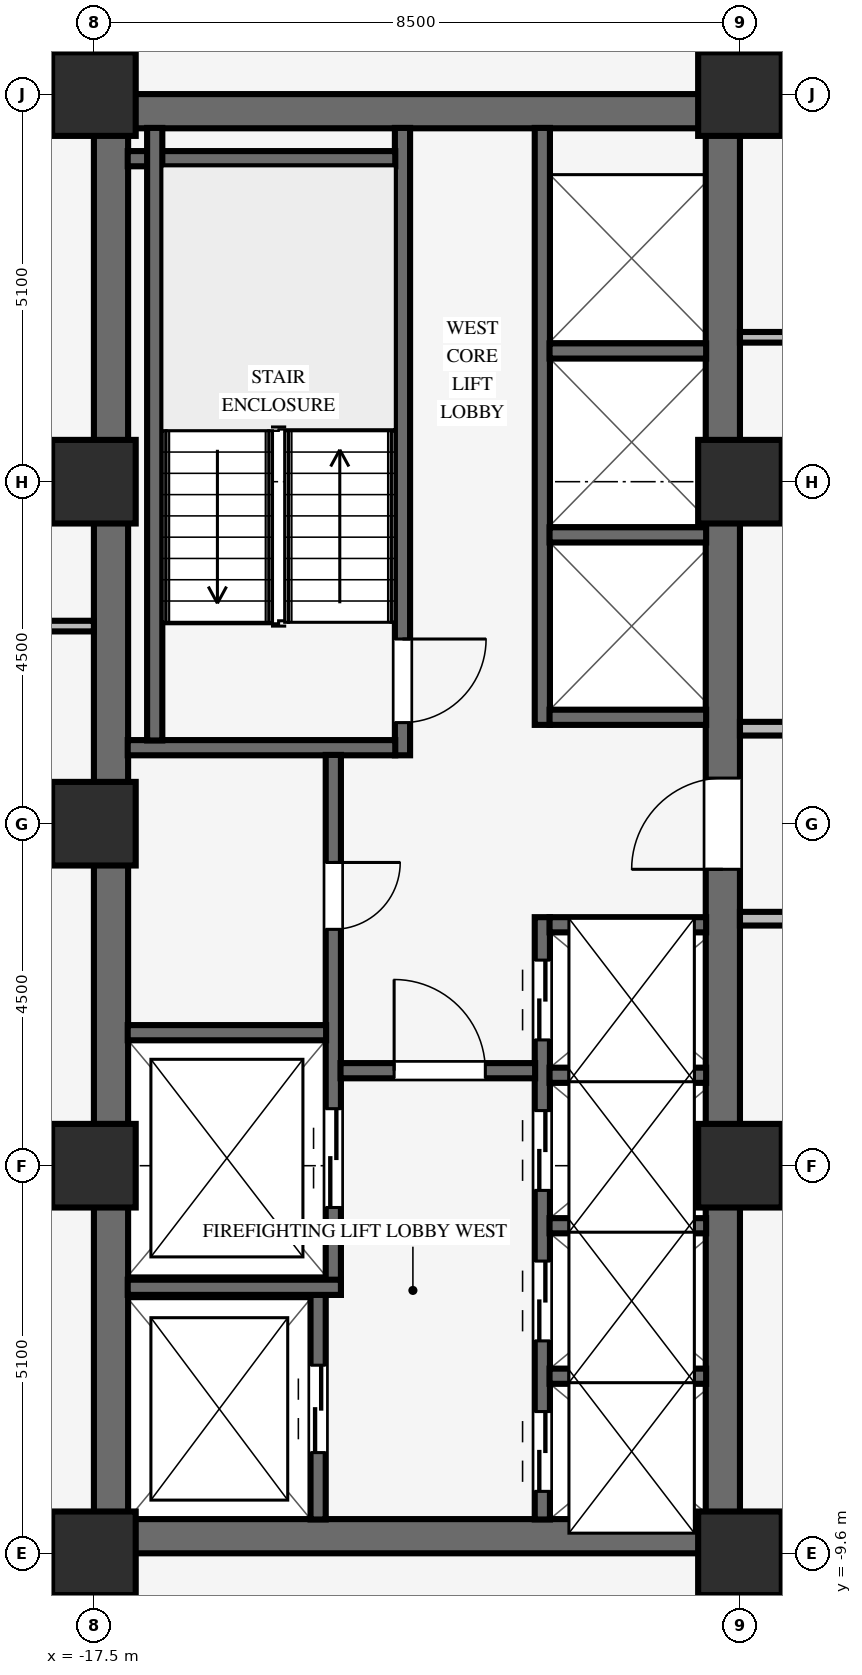
"""IFC4 building model, lengths in metres.
Left out: names, types, materials, properties, quantities, classifications, styles, units other than length and angle.
Written with IfcOpenShell. Run it as: python <this file> out.ifc"""

import sys

from ifc_helpers import new_model, si_unit, direction, frame, frame_2d, origin, origin_2d, place, context, subcontext, project, spatial, rectangle, extrude, source, transform, mapped, element, fill, save


model = new_model("IFC4")
c1 = context("Model", 3, precision=1e-05, world=origin(), true_north=direction((0.0, 1.0)))
c2 = subcontext(c1, "Body", "Model", "MODEL_VIEW")
j1 = project(units=[si_unit("LENGTHUNIT", "METRE"), si_unit("PLANEANGLEUNIT", "RADIAN")], contexts=[c1])
p1 = place(None, origin())
s1 = spatial("IfcSite", under=j1, at=p1, CompositionType="ELEMENT")
p2 = place(p1, origin())
s2 = spatial("IfcBuilding", under=s1, at=p2, CompositionType="ELEMENT")
p3 = place(p2, frame((0.0, 0.0, 67.75)))
s3 = spatial("IfcBuildingStorey", under=s2, at=p3, CompositionType="ELEMENT", Elevation=67.75)
for number, where, z_axis, x_axis in (
    (1, (-17.5, -9.375, 0.0), (0.0, 0.0, 1.0), (1.0, 0.0, 0.0)),
    (2, (-17.5, 9.375, 0.0), (0.0, 0.0, 1.0), (1.0, 0.0, 0.0)),
):
    element("IfcWall", number, at=place(p3, frame(where, z_axis=z_axis, x_axis=x_axis)), inside=s3, PredefinedType="SHEAR", context=c2, shape_type="SweptSolid", body=[
        extrude(rectangle(XDim=8.5, YDim=0.45, at=frame_2d((4.25, 0.0))), origin(), (0.0, 0.0, 1.0), 3.37),
    ])
p4 = place(p3, frame((-17.275, -9.155, 0.0), z_axis=(0.0, 0.0, 1.0), x_axis=(0.0, 1.0, 0.0)))
e3 = element("IfcWall", 3, at=p4, inside=s3, PredefinedType="SHEAR", context=c2, shape_type="SweptSolid", body=[
    extrude(rectangle(XDim=18.31, YDim=0.45, at=frame_2d((9.155, 0.0))), origin(), (0.0, 0.0, 1.0), 3.37),
])
p5 = place(p3, frame((-9.225, -9.155, 0.0), z_axis=(0.0, 0.0, 1.0), x_axis=(0.0, 1.0, 0.0)))
e4 = element("IfcWall", 4, at=p5, inside=s3, PredefinedType="SHEAR", context=c2, shape_type="SweptSolid", body=[
    extrude(rectangle(XDim=18.31, YDim=0.45, at=frame_2d((9.155, 0.0))), origin(), (0.0, 0.0, 1.0), 3.37),
])
p6 = place(p5, frame((8.555, 0.0, 0.0)))
e5 = element("IfcOpeningElement", 5, at=p6, cuts=e4, PredefinedType="OPENING", context=c2, shape_type="SweptSolid", body=[
    extrude(rectangle(XDim=1.2, YDim=2.15, at=frame_2d((0.6, 1.075))), frame((0.0, 0.235, 0.0), z_axis=(0.0, -1.0, 0.0), x_axis=(1.0, 0.0, 0.0)), (0.0, 0.0, 1.0), 0.47),
])
for number, where, z_axis, x_axis in (
    (6, (-17.5, -9.6, 0.0), (0.0, 0.0, 1.0), (1.0, 0.0, 0.0)),
    (7, (-17.5, -4.5, 0.0), (0.0, 0.0, 1.0), (1.0, 0.0, 0.0)),
    (8, (-17.5, 4.5, 0.0), (0.0, 0.0, 1.0), (1.0, 0.0, 0.0)),
    (9, (-17.5, 9.6, 0.0), (0.0, 0.0, 1.0), (1.0, 0.0, 0.0)),
    (10, (-9.0, -9.6, 0.0), (0.0, 0.0, 1.0), (1.0, 0.0, 0.0)),
    (11, (-9.0, -4.5, 0.0), (0.0, 0.0, 1.0), (1.0, 0.0, 0.0)),
    (12, (-9.0, 4.5, 0.0), (0.0, 0.0, 1.0), (1.0, 0.0, 0.0)),
    (13, (-9.0, 9.6, 0.0), (0.0, 0.0, 1.0), (1.0, 0.0, 0.0)),
    (14, (-17.5, 0.0, 0.0), (0.0, 0.0, 1.0), (1.0, 0.0, 0.0)),
):
    element("IfcColumn", number, at=place(p3, frame(where, z_axis=z_axis, x_axis=x_axis)), inside=s3, PredefinedType="COLUMN", context=c2, shape_type="SweptSolid", body=[
        extrude(rectangle(XDim=1.1, YDim=1.1, at=origin_2d()), origin(), (0.0, 0.0, 1.0), 3.37),
    ])
p7 = place(p3, frame((-13.44, 0.9, 0.0), z_axis=(0.0, 0.0, 1.0), x_axis=(0.0, 1.0, 0.0)))
e15 = element("IfcWall", 15, at=p7, inside=s3, PredefinedType="SHEAR", context=c2, shape_type="SweptSolid", body=[
    extrude(rectangle(XDim=8.255, YDim=0.2, at=frame_2d((4.127, 0.0))), origin(), (0.0, 0.0, 1.0), 3.37),
])
p8 = place(p7, frame((1.53, 0.0, 0.0), z_axis=(0.0, 0.0, 1.0), x_axis=(-1.0, 0.0, 0.0)))
e16 = element("IfcOpeningElement", 16, at=p8, cuts=e15, PredefinedType="OPENING", context=c2, shape_type="SweptSolid", body=[
    extrude(rectangle(XDim=1.1, YDim=2.15, at=frame_2d((0.55, 1.075))), frame((0.0, 0.11, 0.0), z_axis=(0.0, -1.0, 0.0), x_axis=(1.0, 0.0, 0.0)), (0.0, 0.0, 1.0), 0.22),
])
for number, where, z_axis, x_axis in (
    (17, (-17.055, 1.0, 0.0), (0.0, 0.0, 1.0), (1.0, 0.0, 0.0)),
    (18, (-17.055, 8.75, 0.0), (0.0, 0.0, 1.0), (1.0, 0.0, 0.0)),
):
    element("IfcWall", number, at=place(p3, frame(where, z_axis=z_axis, x_axis=x_axis)), inside=s3, PredefinedType="SHEAR", context=c2, shape_type="SweptSolid", body=[
        extrude(rectangle(XDim=3.52, YDim=0.2, at=frame_2d((1.76, 0.0))), origin(), (0.0, 0.0, 1.0), 3.37),
    ])
p9 = place(p3, frame((-16.7, 1.095, 0.0), z_axis=(0.0, 0.0, 1.0), x_axis=(0.0, 1.0, 0.0)))
e19 = element("IfcWall", 19, at=p9, inside=s3, PredefinedType="SHEAR", context=c2, shape_type="SweptSolid", body=[
    extrude(rectangle(XDim=8.06, YDim=0.2, at=frame_2d((4.03, 0.0))), origin(), (0.0, 0.0, 1.0), 3.37),
])
p10 = place(p3, frame((-14.55, -9.155, 0.0), z_axis=(0.0, 0.0, 1.0), x_axis=(0.0, 1.0, 0.0)))
e20 = element("IfcWall", 20, at=p10, inside=s3, PredefinedType="SHEAR", context=c2, shape_type="SweptSolid", body=[
    extrude(rectangle(XDim=2.96, YDim=0.2, at=frame_2d((1.48, 0.0))), origin(), (0.0, 0.0, 1.0), 3.37),
])
p11 = place(p10, frame((0.88, 0.0, 0.0)))
e21 = element("IfcOpeningElement", 21, at=p11, cuts=e20, PredefinedType="OPENING", context=c2, shape_type="SweptSolid", body=[
    extrude(rectangle(XDim=1.15, YDim=2.15, at=frame_2d((0.575, 1.075))), frame((0.0, 0.11, 0.0), z_axis=(0.0, -1.0, 0.0), x_axis=(1.0, 0.0, 0.0)), (0.0, 0.0, 1.0), 0.22),
])
p12 = place(p3, frame((-14.35, -6.2, 0.0), z_axis=(0.0, 0.0, 1.0), x_axis=(0.0, 1.0, 0.0)))
e22 = element("IfcWall", 22, at=p12, inside=s3, PredefinedType="SHEAR", context=c2, shape_type="SweptSolid", body=[
    extrude(rectangle(XDim=7.105, YDim=0.2, at=frame_2d((3.552, 0.0))), origin(), (0.0, 0.0, 1.0), 3.37),
])
p13 = place(p12, frame((5.69, 0.0, 0.0), z_axis=(0.0, 0.0, 1.0), x_axis=(-1.0, 0.0, 0.0)))
e23 = element("IfcOpeningElement", 23, at=p13, cuts=e22, PredefinedType="OPENING", context=c2, shape_type="SweptSolid", body=[
    extrude(rectangle(XDim=0.88, YDim=2.1, at=frame_2d((0.44, 1.05))), frame((0.0, 0.11, 0.0), z_axis=(0.0, -1.0, 0.0), x_axis=(1.0, 0.0, 0.0)), (0.0, 0.0, 1.0), 0.22),
])
p14 = place(p12, frame((1.15, 0.0, 0.0)))
e24 = element("IfcOpeningElement", 24, at=p14, cuts=e22, PredefinedType="OPENING", context=c2, shape_type="SweptSolid", body=[
    extrude(rectangle(XDim=1.3, YDim=2.2, at=frame_2d((0.65, 1.1))), frame((0.0, 0.11, 0.0), z_axis=(0.0, -1.0, 0.0), x_axis=(1.0, 0.0, 0.0)), (0.0, 0.0, 1.0), 0.22),
])
p15 = place(p3, frame((-17.055, -6.1, 0.0), z_axis=(0.0, 0.0, 1.0), x_axis=(1.0, 0.0, 0.0)))
e25 = element("IfcWall", 25, at=p15, inside=s3, PredefinedType="SHEAR", context=c2, shape_type="SweptSolid", body=[
    extrude(rectangle(XDim=2.805, YDim=0.2, at=frame_2d((1.402, 0.0))), origin(), (0.0, 0.0, 1.0), 3.37),
])
p16 = place(p3, frame((-17.055, -2.75, 0.0), z_axis=(0.0, 0.0, 1.0), x_axis=(1.0, 0.0, 0.0)))
e26 = element("IfcWall", 26, at=p16, inside=s3, PredefinedType="SHEAR", context=c2, shape_type="SweptSolid", body=[
    extrude(rectangle(XDim=2.61, YDim=0.2, at=frame_2d((1.305, 0.0))), origin(), (0.0, 0.0, 1.0), 3.37),
])
p17 = place(p3, frame((-11.6, -9.155, 0.0), z_axis=(0.0, 0.0, 1.0), x_axis=(0.0, 1.0, 0.0)))
e27 = element("IfcWall", 27, at=p17, inside=s3, PredefinedType="SHEAR", context=c2, shape_type="SweptSolid", body=[
    extrude(rectangle(XDim=7.925, YDim=0.2, at=frame_2d((3.962, 0.0))), origin(), (0.0, 0.0, 1.0), 3.37),
])
p18 = place(p17, frame((0.37, 0.0, 0.0)))
e28 = element("IfcOpeningElement", 28, at=p18, cuts=e27, PredefinedType="OPENING", context=c2, shape_type="SweptSolid", body=[
    extrude(rectangle(XDim=1.05, YDim=2.15, at=frame_2d((0.525, 1.075))), frame((0.0, 0.11, 0.0), z_axis=(0.0, -1.0, 0.0), x_axis=(1.0, 0.0, 0.0)), (0.0, 0.0, 1.0), 0.22),
])
p19 = place(p17, frame((2.35, 0.0, 0.0)))
e29 = element("IfcOpeningElement", 29, at=p19, cuts=e27, PredefinedType="OPENING", context=c2, shape_type="SweptSolid", body=[
    extrude(rectangle(XDim=1.05, YDim=2.15, at=frame_2d((0.525, 1.075))), frame((0.0, 0.11, 0.0), z_axis=(0.0, -1.0, 0.0), x_axis=(1.0, 0.0, 0.0)), (0.0, 0.0, 1.0), 0.22),
])
p20 = place(p17, frame((4.33, 0.0, 0.0)))
e30 = element("IfcOpeningElement", 30, at=p20, cuts=e27, PredefinedType="OPENING", context=c2, shape_type="SweptSolid", body=[
    extrude(rectangle(XDim=1.05, YDim=2.15, at=frame_2d((0.525, 1.075))), frame((0.0, 0.11, 0.0), z_axis=(0.0, -1.0, 0.0), x_axis=(1.0, 0.0, 0.0)), (0.0, 0.0, 1.0), 0.22),
])
p21 = place(p17, frame((6.31, 0.0, 0.0)))
e31 = element("IfcOpeningElement", 31, at=p21, cuts=e27, PredefinedType="OPENING", context=c2, shape_type="SweptSolid", body=[
    extrude(rectangle(XDim=1.05, YDim=2.15, at=frame_2d((0.525, 1.075))), frame((0.0, 0.11, 0.0), z_axis=(0.0, -1.0, 0.0), x_axis=(1.0, 0.0, 0.0)), (0.0, 0.0, 1.0), 0.22),
])
p22 = place(p3, frame((-14.255, -3.25, 0.0), z_axis=(0.0, 0.0, 1.0), x_axis=(1.0, 0.0, 0.0)))
e32 = element("IfcWall", 32, at=p22, inside=s3, PredefinedType="SHEAR", context=c2, shape_type="SweptSolid", body=[
    extrude(rectangle(XDim=2.56, YDim=0.2, at=frame_2d((1.28, 0.0))), origin(), (0.0, 0.0, 1.0), 3.37),
])
p23 = place(p22, frame((0.705, 0.0, 0.0)))
e33 = element("IfcOpeningElement", 33, at=p23, cuts=e32, PredefinedType="OPENING", context=c2, shape_type="SweptSolid", body=[
    extrude(rectangle(XDim=1.2, YDim=2.15, at=frame_2d((0.6, 1.075))), frame((0.0, 0.11, 0.0), z_axis=(0.0, -1.0, 0.0), x_axis=(1.0, 0.0, 0.0)), (0.0, 0.0, 1.0), 0.22),
])
for number, where, z_axis, x_axis in (
    (34, (-11.505, -7.27, 0.0), (0.0, 0.0, 1.0), (1.0, 0.0, 0.0)),
    (35, (-11.505, -5.29, 0.0), (0.0, 0.0, 1.0), (1.0, 0.0, 0.0)),
    (36, (-11.505, -3.31, 0.0), (0.0, 0.0, 1.0), (1.0, 0.0, 0.0)),
    (37, (-11.505, -1.33, 0.0), (0.0, 0.0, 1.0), (1.0, 0.0, 0.0)),
):
    element("IfcWall", number, at=place(p3, frame(where, z_axis=z_axis, x_axis=x_axis)), inside=s3, PredefinedType="SHEAR", context=c2, shape_type="SweptSolid", body=[
        extrude(rectangle(XDim=2.06, YDim=0.2, at=frame_2d((1.03, 0.0))), origin(), (0.0, 0.0, 1.0), 3.37),
    ])
p24 = place(p3, frame((-11.6, 1.3, 0.0), z_axis=(0.0, 0.0, 1.0), x_axis=(0.0, 1.0, 0.0)))
e38 = element("IfcWall", 38, at=p24, inside=s3, PredefinedType="SHEAR", context=c2, shape_type="SweptSolid", body=[
    extrude(rectangle(XDim=7.855, YDim=0.2, at=frame_2d((3.927, 0.0))), origin(), (0.0, 0.0, 1.0), 3.37),
])
for number, where, z_axis, x_axis in (
    (39, (-11.505, 1.4, 0.0), (0.0, 0.0, 1.0), (1.0, 0.0, 0.0)),
    (40, (-11.505, 3.8, 0.0), (0.0, 0.0, 1.0), (1.0, 0.0, 0.0)),
    (41, (-11.505, 6.22, 0.0), (0.0, 0.0, 1.0), (1.0, 0.0, 0.0)),
):
    element("IfcWall", number, at=place(p3, frame(where, z_axis=z_axis, x_axis=x_axis)), inside=s3, PredefinedType="SHEAR", context=c2, shape_type="SweptSolid", body=[
        extrude(rectangle(XDim=2.06, YDim=0.2, at=frame_2d((1.03, 0.0))), origin(), (0.0, 0.0, 1.0), 3.37),
    ])
p25 = place(p3, frame((-8.454, -9.6, 0.0), z_axis=(0.0, 0.0, 1.0), x_axis=(1.0, 0.0, 0.0)))
e42 = element("IfcWall", 42, at=p25, inside=s3, PredefinedType="PARTITIONING", context=c2, shape_type="SweptSolid", body=[
    extrude(rectangle(XDim=5.254, YDim=0.18, at=frame_2d((2.627, 0.0))), origin(), (0.0, 0.0, 1.0), 2.405),
])
p26 = place(p3, frame((-9.0, -1.25, 0.0), z_axis=(0.0, 0.0, 1.0), x_axis=(1.0, 0.0, 0.0)))
e43 = element("IfcWall", 43, at=p26, inside=s3, PredefinedType="PARTITIONING", context=c2, shape_type="SweptSolid", body=[
    extrude(rectangle(XDim=5.8, YDim=0.18, at=frame_2d((2.9, 0.0))), origin(), (0.0, 0.0, 1.0), 3.36),
])
p27 = place(p3, frame((-9.0, 1.25, 0.0), z_axis=(0.0, 0.0, 1.0), x_axis=(1.0, 0.0, 0.0)))
e44 = element("IfcWall", 44, at=p27, inside=s3, PredefinedType="PARTITIONING", context=c2, shape_type="SweptSolid", body=[
    extrude(rectangle(XDim=5.8, YDim=0.18, at=frame_2d((2.9, 0.0))), origin(), (0.0, 0.0, 1.0), 3.36),
])
p28 = place(p27, frame((2.42, 0.0, 0.0)))
e45 = element("IfcOpeningElement", 45, at=p28, cuts=e44, PredefinedType="OPENING", context=c2, shape_type="SweptSolid", body=[
    extrude(rectangle(XDim=0.96, YDim=2.1, at=frame_2d((0.48, 1.05))), frame((0.0, 0.1, 0.0), z_axis=(0.0, -1.0, 0.0), x_axis=(1.0, 0.0, 0.0)), (0.0, 0.0, 1.0), 0.2),
])
p29 = place(p3, frame((-21.16, 2.6, 0.0), z_axis=(0.0, 0.0, 1.0), x_axis=(1.0, 0.0, 0.0)))
e46 = element("IfcWall", 46, at=p29, inside=s3, PredefinedType="PARTITIONING", context=c2, shape_type="SweptSolid", body=[
    extrude(rectangle(XDim=3.66, YDim=0.14, at=frame_2d((1.83, 0.0))), origin(), (0.0, 0.0, 1.0), 3.36),
])
p30 = place(p3, frame((-9.0, 6.4, 0.0), z_axis=(0.0, 0.0, 1.0), x_axis=(1.0, 0.0, 0.0)))
e47 = element("IfcWall", 47, at=p30, inside=s3, PredefinedType="PARTITIONING", context=c2, shape_type="SweptSolid", body=[
    extrude(rectangle(XDim=5.714, YDim=0.14, at=frame_2d((2.857, 0.0))), origin(), (0.0, 0.0, 1.0), 3.36),
])
p31 = place(p3, frame((-8.454, 9.6, 0.0), z_axis=(0.0, 0.0, 1.0), x_axis=(1.0, 0.0, 0.0)))
e48 = element("IfcWall", 48, at=p31, inside=s3, PredefinedType="PARTITIONING", context=c2, shape_type="SweptSolid", body=[
    extrude(rectangle(XDim=5.254, YDim=0.18, at=frame_2d((2.627, 0.0))), origin(), (0.0, 0.0, 1.0), 2.405),
])
p32 = place(p31, frame((2.147, 0.0, 0.0)))
e49 = element("IfcOpeningElement", 49, at=p32, cuts=e48, PredefinedType="OPENING", context=c2, shape_type="SweptSolid", body=[
    extrude(rectangle(XDim=0.96, YDim=2.1, at=frame_2d((0.48, 1.05))), frame((0.0, 0.1, 0.0), z_axis=(0.0, -1.0, 0.0), x_axis=(1.0, 0.0, 0.0)), (0.0, 0.0, 1.0), 0.2),
])
for number, where, z_axis, x_axis in (
    (50, (-17.5, -11.114, 0.0), (0.0, 0.0, 1.0), (0.0, 1.0, 0.0)),
    (51, (-17.5, 10.146, 0.0), (0.0, 0.0, 1.0), (0.0, 1.0, 0.0)),
):
    element("IfcWall", number, at=place(p3, frame(where, z_axis=z_axis, x_axis=x_axis)), inside=s3, PredefinedType="PARTITIONING", context=c2, shape_type="SweptSolid", body=[
        extrude(rectangle(XDim=0.968, YDim=0.18, at=frame_2d((0.484, 0.0))), origin(), (0.0, 0.0, 1.0), 2.738),
    ])
m1 = source(origin(), c2, "Body", "SweptSolid", [
    extrude(rectangle(XDim=1.1, YDim=2.15, at=frame_2d((0.55, 1.075))), frame((0.0, 0.025, 0.0), z_axis=(0.0, -1.0, 0.0), x_axis=(1.0, 0.0, 0.0)), (0.0, 0.0, 1.0), 0.05),
])
p33 = place(p8, origin())
e52 = element("IfcDoor", 52, at=p33, inside=s3, OperationType="SINGLE_SWING_LEFT", PredefinedType="DOOR", context=c2, shape_type="MappedRepresentation", body=[
    mapped(m1, transform((0.0, 0.0, 0.0), scale=1.0)),
])
fill(e16, e52)
m2 = source(origin(), c2, "Body", "SweptSolid", [
    extrude(rectangle(XDim=0.88, YDim=2.1, at=frame_2d((0.44, 1.05))), frame((0.0, 0.025, 0.0), z_axis=(0.0, -1.0, 0.0), x_axis=(1.0, 0.0, 0.0)), (0.0, 0.0, 1.0), 0.05),
])
p34 = place(p13, origin())
e53 = element("IfcDoor", 53, at=p34, inside=s3, OperationType="SINGLE_SWING_LEFT", PredefinedType="DOOR", context=c2, shape_type="MappedRepresentation", body=[
    mapped(m2, transform((0.0, 0.0, 0.0), scale=1.0)),
])
fill(e23, e53)
m3 = source(origin(), c2, "Body", "SweptSolid", [
    extrude(rectangle(XDim=1.2, YDim=2.15, at=frame_2d((0.6, 1.075))), frame((0.0, 0.025, 0.0), z_axis=(0.0, -1.0, 0.0), x_axis=(1.0, 0.0, 0.0)), (0.0, 0.0, 1.0), 0.05),
])
p35 = place(p23, origin())
e54 = element("IfcDoor", 54, at=p35, inside=s3, OperationType="SINGLE_SWING_LEFT", PredefinedType="DOOR", context=c2, shape_type="MappedRepresentation", body=[
    mapped(m3, transform((0.0, 0.0, 0.0), scale=1.0)),
])
fill(e33, e54)
p36 = place(p6, origin())
e55 = element("IfcDoor", 55, at=p36, inside=s3, OperationType="SINGLE_SWING_LEFT", PredefinedType="DOOR", context=c2, shape_type="MappedRepresentation", body=[
    mapped(m3, transform((0.0, 0.0, 0.0), scale=1.0)),
])
fill(e5, e55)
m4 = source(origin(), c2, "Body", "SweptSolid", [
    extrude(rectangle(XDim=1.15, YDim=2.15, at=frame_2d((0.575, 1.075))), frame((0.0, 0.025, 0.0), z_axis=(0.0, -1.0, 0.0), x_axis=(1.0, 0.0, 0.0)), (0.0, 0.0, 1.0), 0.05),
])
p37 = place(p11, origin())
e56 = element("IfcDoor", 56, at=p37, inside=s3, OperationType="DOUBLE_DOOR_SLIDING", PredefinedType="DOOR", context=c2, shape_type="MappedRepresentation", body=[
    mapped(m4, transform((0.0, 0.0, 0.0), scale=1.0)),
])
fill(e21, e56)
m5 = source(origin(), c2, "Body", "SweptSolid", [
    extrude(rectangle(XDim=1.3, YDim=2.2, at=frame_2d((0.65, 1.1))), frame((0.0, 0.025, 0.0), z_axis=(0.0, -1.0, 0.0), x_axis=(1.0, 0.0, 0.0)), (0.0, 0.0, 1.0), 0.05),
])
p38 = place(p14, origin())
e57 = element("IfcDoor", 57, at=p38, inside=s3, OperationType="DOUBLE_DOOR_SLIDING", PredefinedType="DOOR", context=c2, shape_type="MappedRepresentation", body=[
    mapped(m5, transform((0.0, 0.0, 0.0), scale=1.0)),
])
fill(e24, e57)
m6 = source(origin(), c2, "Body", "SweptSolid", [
    extrude(rectangle(XDim=1.05, YDim=2.15, at=frame_2d((0.525, 1.075))), frame((0.0, 0.025, 0.0), z_axis=(0.0, -1.0, 0.0), x_axis=(1.0, 0.0, 0.0)), (0.0, 0.0, 1.0), 0.05),
])
p39 = place(p18, origin())
e58 = element("IfcDoor", 58, at=p39, inside=s3, OperationType="DOUBLE_DOOR_SLIDING", PredefinedType="DOOR", context=c2, shape_type="MappedRepresentation", body=[
    mapped(m6, transform((0.0, 0.0, 0.0), scale=1.0)),
])
fill(e28, e58)
p40 = place(p19, origin())
e59 = element("IfcDoor", 59, at=p40, inside=s3, OperationType="DOUBLE_DOOR_SLIDING", PredefinedType="DOOR", context=c2, shape_type="MappedRepresentation", body=[
    mapped(m6, transform((0.0, 0.0, 0.0), scale=1.0)),
])
fill(e29, e59)
p41 = place(p20, origin())
e60 = element("IfcDoor", 60, at=p41, inside=s3, OperationType="DOUBLE_DOOR_SLIDING", PredefinedType="DOOR", context=c2, shape_type="MappedRepresentation", body=[
    mapped(m6, transform((0.0, 0.0, 0.0), scale=1.0)),
])
fill(e30, e60)
p42 = place(p21, origin())
e61 = element("IfcDoor", 61, at=p42, inside=s3, OperationType="DOUBLE_DOOR_SLIDING", PredefinedType="DOOR", context=c2, shape_type="MappedRepresentation", body=[
    mapped(m6, transform((0.0, 0.0, 0.0), scale=1.0)),
])
fill(e31, e61)
save(model, sys.argv[1])
